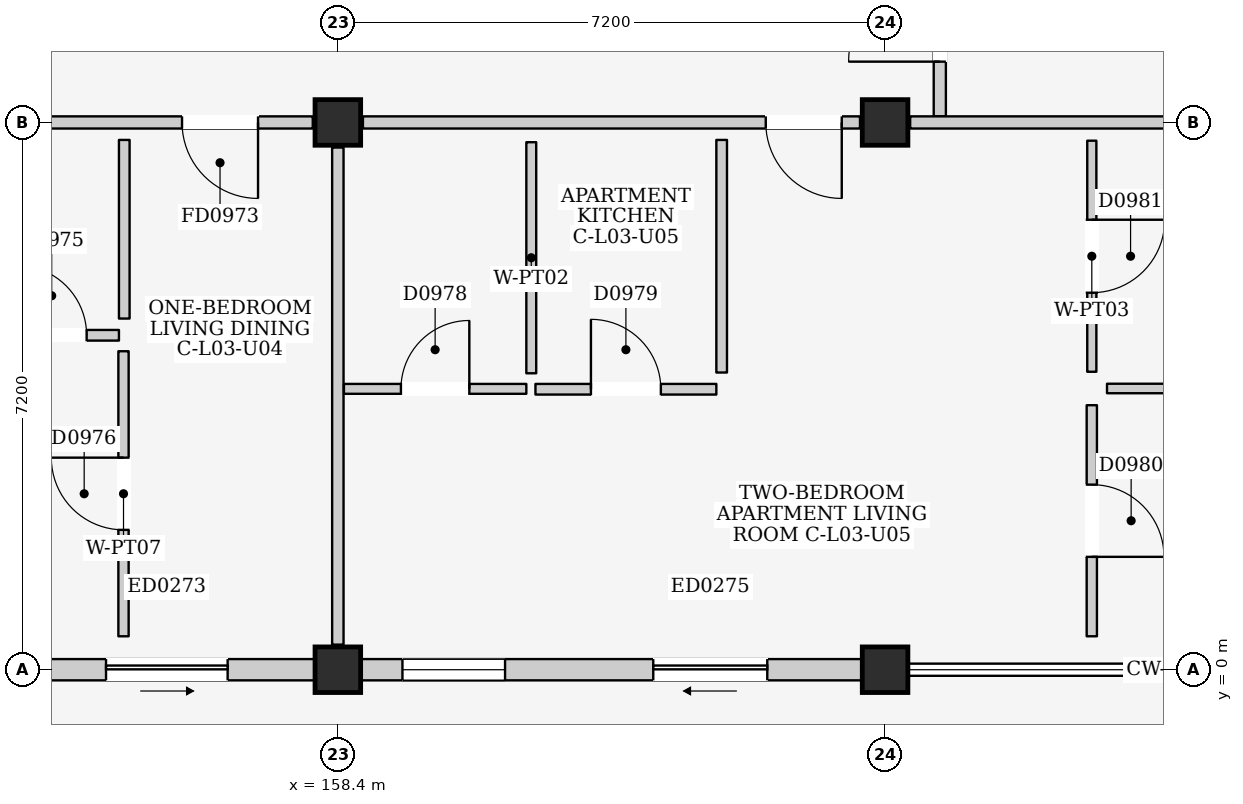
"""IFC4 building model, lengths in metres.
Left out: names, types, materials, properties, quantities, classifications, styles, units other than length and angle.
Written with IfcOpenShell. Run it as: python <this file> out.ifc"""

import sys

from ifc_helpers import new_model, si_unit, direction, frame, frame_2d, origin, origin_2d, place, context, subcontext, project, spatial, rectangle, extrude, element, fill, save


model = new_model("IFC4")
c1 = context("Model", 3, precision=1e-05, world=origin(), true_north=direction((0.0, 1.0)))
c2 = subcontext(c1, "Body", "Model", "MODEL_VIEW")
j1 = project(units=[si_unit("LENGTHUNIT", "METRE"), si_unit("PLANEANGLEUNIT", "RADIAN")], contexts=[c1])
p1 = place(None, origin())
s1 = spatial("IfcSite", under=j1, at=p1, CompositionType="ELEMENT")
p2 = place(p1, origin())
s2 = spatial("IfcBuilding", under=s1, at=p2, CompositionType="ELEMENT")
p3 = place(p2, frame((0.0, 0.0, 12.2)))
s3 = spatial("IfcBuildingStorey", under=s2, at=p3, CompositionType="ELEMENT", Elevation=12.2)
for number, where, z_axis, x_axis in (
    (1, (158.4, 0.0, 0.0), (0.0, 0.0, 1.0), (1.0, 0.0, 0.0)),
    (2, (158.4, 7.2, 0.0), (0.0, 0.0, 1.0), (1.0, 0.0, 0.0)),
    (3, (165.6, 0.0, 0.0), (0.0, 0.0, 1.0), (1.0, 0.0, 0.0)),
    (4, (165.6, 7.2, 0.0), (0.0, 0.0, 1.0), (1.0, 0.0, 0.0)),
):
    element("IfcColumn", number, at=place(p3, frame(where, z_axis=z_axis, x_axis=x_axis)), inside=s3, PredefinedType="COLUMN", context=c2, shape_type="SweptSolid", body=[
        extrude(rectangle(XDim=0.6, YDim=0.6, at=origin_2d()), origin(), (0.0, 0.0, 1.0), 3.2),
    ])
p4 = place(p3, frame((151.5, 0.0, 0.0), z_axis=(0.0, 0.0, 1.0), x_axis=(1.0, 0.0, 0.0)))
e5 = element("IfcWall", 5, at=p4, inside=s3, PredefinedType="ELEMENTEDWALL", context=c2, shape_type="SweptSolid", body=[
    extrude(rectangle(XDim=6.6, YDim=0.28, at=frame_2d((3.3, 0.0))), origin(), (0.0, 0.0, 1.0), 2.445),
])
p5 = place(p4, frame((3.85, 0.0, 0.0)))
e6 = element("IfcOpeningElement", 6, at=p5, cuts=e5, PredefinedType="OPENING", context=c2, shape_type="SweptSolid", body=[
    extrude(rectangle(XDim=1.6, YDim=2.12, at=frame_2d((0.8, 1.06))), frame((0.0, 0.155, 0.0), z_axis=(0.0, -1.0, 0.0), x_axis=(1.0, 0.0, 0.0)), (0.0, 0.0, 1.0), 0.31),
])
p6 = place(p4, frame((0.55, 0.0, 0.9)))
e7 = element("IfcOpeningElement", 7, at=p6, cuts=e5, PredefinedType="OPENING", context=c2, shape_type="SweptSolid", body=[
    extrude(rectangle(XDim=1.4, YDim=1.2, at=frame_2d((0.7, 0.6))), frame((0.0, 0.155, 0.0), z_axis=(0.0, -1.0, 0.0), x_axis=(1.0, 0.0, 0.0)), (0.0, 0.0, 1.0), 0.31),
])
p7 = place(p3, frame((158.7, 0.0, 0.0), z_axis=(0.0, 0.0, 1.0), x_axis=(1.0, 0.0, 0.0)))
e8 = element("IfcWall", 8, at=p7, inside=s3, PredefinedType="ELEMENTEDWALL", context=c2, shape_type="SweptSolid", body=[
    extrude(rectangle(XDim=6.6, YDim=0.28, at=frame_2d((3.3, 0.0))), origin(), (0.0, 0.0, 1.0), 2.445),
])
p8 = place(p7, frame((3.85, 0.0, 0.0)))
e9 = element("IfcOpeningElement", 9, at=p8, cuts=e8, PredefinedType="OPENING", context=c2, shape_type="SweptSolid", body=[
    extrude(rectangle(XDim=1.5, YDim=2.12, at=frame_2d((0.75, 1.06))), frame((0.0, 0.155, 0.0), z_axis=(0.0, -1.0, 0.0), x_axis=(1.0, 0.0, 0.0)), (0.0, 0.0, 1.0), 0.31),
])
p9 = place(p7, frame((0.55, 0.0, 0.835)))
e10 = element("IfcOpeningElement", 10, at=p9, cuts=e8, PredefinedType="OPENING", context=c2, shape_type="SweptSolid", body=[
    extrude(rectangle(XDim=1.35, YDim=1.5, at=frame_2d((0.675, 0.75))), frame((0.0, 0.155, 0.0), z_axis=(0.0, -1.0, 0.0), x_axis=(1.0, 0.0, 0.0)), (0.0, 0.0, 1.0), 0.31),
])
p10 = place(p3, frame((166.32, 7.28, 0.0), z_axis=(0.0, 0.0, 1.0), x_axis=(0.0, 1.0, 0.0)))
e11 = element("IfcWall", 11, at=p10, inside=s3, PredefinedType="PARTITIONING", context=c2, shape_type="SweptSolid", body=[
    extrude(rectangle(XDim=4.32, YDim=0.16, at=frame_2d((2.16, 0.0))), origin(), (0.0, 0.0, 1.0), 2.98),
])
p11 = place(p10, frame((0.72, 0.0, 0.0)))
e12 = element("IfcOpeningElement", 12, at=p11, cuts=e11, PredefinedType="OPENING", context=c2, shape_type="SweptSolid", body=[
    extrude(rectangle(XDim=1.2, YDim=2.2, at=frame_2d((0.6, 1.1))), frame((0.0, 0.095, 0.0), z_axis=(0.0, -1.0, 0.0), x_axis=(1.0, 0.0, 0.0)), (0.0, 0.0, 1.0), 0.19),
])
p12 = place(p3, frame((151.53, 7.2, 0.0), z_axis=(0.0, 0.0, 1.0), x_axis=(1.0, 0.0, 0.0)))
e13 = element("IfcWall", 13, at=p12, inside=s3, PredefinedType="PARTITIONING", context=c2, shape_type="SweptSolid", body=[
    extrude(rectangle(XDim=6.54, YDim=0.16, at=frame_2d((3.27, 0.0))), origin(), (0.0, 0.0, 1.0), 2.365),
])
p13 = place(p12, frame((4.82, 0.0, 0.0)))
e14 = element("IfcOpeningElement", 14, at=p13, cuts=e13, PredefinedType="OPENING", context=c2, shape_type="SweptSolid", body=[
    extrude(rectangle(XDim=1.0, YDim=2.15, at=frame_2d((0.5, 1.075))), frame((0.0, 0.095, 0.0), z_axis=(0.0, -1.0, 0.0), x_axis=(1.0, 0.0, 0.0)), (0.0, 0.0, 1.0), 0.19),
])
p14 = place(p3, frame((158.4, 0.33, 0.0), z_axis=(0.0, 0.0, 1.0), x_axis=(0.0, 1.0, 0.0)))
e15 = element("IfcWall", 15, at=p14, inside=s3, PredefinedType="PARTITIONING", context=c2, shape_type="SweptSolid", body=[
    extrude(rectangle(XDim=6.54, YDim=0.15, at=frame_2d((3.27, 0.0))), origin(), (0.0, 0.0, 1.0), 2.415),
])
p15 = place(p3, frame((153.75, 4.4, 0.0), z_axis=(0.0, 0.0, 1.0), x_axis=(1.0, 0.0, 0.0)))
e16 = element("IfcWall", 16, at=p15, inside=s3, PredefinedType="PARTITIONING", context=c2, shape_type="SweptSolid", body=[
    extrude(rectangle(XDim=1.77, YDim=0.14, at=frame_2d((0.885, 0.0))), origin(), (0.0, 0.0, 1.0), 2.98),
])
p16 = place(p15, frame((0.425, 0.0, 0.0)))
e17 = element("IfcOpeningElement", 17, at=p16, cuts=e16, PredefinedType="OPENING", context=c2, shape_type="SweptSolid", body=[
    extrude(rectangle(XDim=0.92, YDim=2.1, at=frame_2d((0.46, 1.05))), frame((0.0, 0.085, 0.0), z_axis=(0.0, -1.0, 0.0), x_axis=(1.0, 0.0, 0.0)), (0.0, 0.0, 1.0), 0.17),
])
p17 = place(p3, frame((155.59, 4.62, 0.0), z_axis=(0.0, 0.0, 1.0), x_axis=(0.0, 1.0, 0.0)))
e18 = element("IfcWall", 18, at=p17, inside=s3, PredefinedType="PARTITIONING", context=c2, shape_type="SweptSolid", body=[
    extrude(rectangle(XDim=2.35, YDim=0.14, at=frame_2d((1.175, 0.0))), origin(), (0.0, 0.0, 1.0), 2.98),
])
p18 = place(p3, frame((155.58, 0.44, 0.0), z_axis=(0.0, 0.0, 1.0), x_axis=(0.0, 1.0, 0.0)))
e19 = element("IfcWall", 19, at=p18, inside=s3, PredefinedType="PARTITIONING", context=c2, shape_type="SweptSolid", body=[
    extrude(rectangle(XDim=3.75, YDim=0.135, at=frame_2d((1.875, 0.0))), origin(), (0.0, 0.0, 1.0), 2.98),
])
p19 = place(p18, frame((1.4, 0.0, 0.0)))
e20 = element("IfcOpeningElement", 20, at=p19, cuts=e19, PredefinedType="OPENING", context=c2, shape_type="SweptSolid", body=[
    extrude(rectangle(XDim=0.95, YDim=2.15, at=frame_2d((0.475, 1.075))), frame((0.0, 0.083, 0.0), z_axis=(0.0, -1.0, 0.0), x_axis=(1.0, 0.0, 0.0)), (0.0, 0.0, 1.0), 0.165),
])
p20 = place(p3, frame((158.73, 7.2, 0.0), z_axis=(0.0, 0.0, 1.0), x_axis=(1.0, 0.0, 0.0)))
e21 = element("IfcWall", 21, at=p20, inside=s3, PredefinedType="PARTITIONING", context=c2, shape_type="SweptSolid", body=[
    extrude(rectangle(XDim=6.54, YDim=0.16, at=frame_2d((3.27, 0.0))), origin(), (0.0, 0.0, 1.0), 2.365),
])
p21 = place(p20, frame((5.3, 0.0, 0.0)))
e22 = element("IfcOpeningElement", 22, at=p21, cuts=e21, PredefinedType="OPENING", context=c2, shape_type="SweptSolid", body=[
    extrude(rectangle(XDim=1.0, YDim=2.15, at=frame_2d((0.5, 1.075))), frame((0.0, 0.095, 0.0), z_axis=(0.0, -1.0, 0.0), x_axis=(1.0, 0.0, 0.0)), (0.0, 0.0, 1.0), 0.19),
])
p22 = place(p3, frame((165.93, 7.2, 0.0), z_axis=(0.0, 0.0, 1.0), x_axis=(1.0, 0.0, 0.0)))
e23 = element("IfcWall", 23, at=p22, inside=s3, PredefinedType="PARTITIONING", context=c2, shape_type="SweptSolid", body=[
    extrude(rectangle(XDim=6.54, YDim=0.16, at=frame_2d((3.27, 0.0))), origin(), (0.0, 0.0, 1.0), 2.365),
])
p23 = place(p3, frame((158.48, 3.695, 0.0), z_axis=(0.0, 0.0, 1.0), x_axis=(1.0, 0.0, 0.0)))
e24 = element("IfcWall", 24, at=p23, inside=s3, PredefinedType="PARTITIONING", context=c2, shape_type="SweptSolid", body=[
    extrude(rectangle(XDim=2.4, YDim=0.13, at=frame_2d((1.2, 0.0))), origin(), (0.0, 0.0, 1.0), 2.98),
])
p24 = place(p23, frame((0.75, 0.0, 0.0)))
e25 = element("IfcOpeningElement", 25, at=p24, cuts=e24, PredefinedType="OPENING", context=c2, shape_type="SweptSolid", body=[
    extrude(rectangle(XDim=0.9, YDim=2.1, at=frame_2d((0.45, 1.05))), frame((0.0, 0.08, 0.0), z_axis=(0.0, -1.0, 0.0), x_axis=(1.0, 0.0, 0.0)), (0.0, 0.0, 1.0), 0.16),
])
p25 = place(p3, frame((160.945, 3.9, 0.0), z_axis=(0.0, 0.0, 1.0), x_axis=(0.0, 1.0, 0.0)))
e26 = element("IfcWall", 26, at=p25, inside=s3, PredefinedType="PARTITIONING", context=c2, shape_type="SweptSolid", body=[
    extrude(rectangle(XDim=3.04, YDim=0.13, at=frame_2d((1.52, 0.0))), origin(), (0.0, 0.0, 1.0), 2.98),
])
p26 = place(p3, frame((161.0, 3.69, 0.0), z_axis=(0.0, 0.0, 1.0), x_axis=(1.0, 0.0, 0.0)))
e27 = element("IfcWall", 27, at=p26, inside=s3, PredefinedType="PARTITIONING", context=c2, shape_type="SweptSolid", body=[
    extrude(rectangle(XDim=2.38, YDim=0.14, at=frame_2d((1.19, 0.0))), origin(), (0.0, 0.0, 1.0), 2.98),
])
p27 = place(p26, frame((0.73, 0.0, 0.0)))
e28 = element("IfcOpeningElement", 28, at=p27, cuts=e27, PredefinedType="OPENING", context=c2, shape_type="SweptSolid", body=[
    extrude(rectangle(XDim=0.92, YDim=2.1, at=frame_2d((0.46, 1.05))), frame((0.0, 0.085, 0.0), z_axis=(0.0, -1.0, 0.0), x_axis=(1.0, 0.0, 0.0)), (0.0, 0.0, 1.0), 0.17),
])
p28 = place(p3, frame((163.45, 3.91, 0.0), z_axis=(0.0, 0.0, 1.0), x_axis=(0.0, 1.0, 0.0)))
e29 = element("IfcWall", 29, at=p28, inside=s3, PredefinedType="PARTITIONING", context=c2, shape_type="SweptSolid", body=[
    extrude(rectangle(XDim=3.06, YDim=0.14, at=frame_2d((1.53, 0.0))), origin(), (0.0, 0.0, 1.0), 2.98),
])
p29 = place(p3, frame((168.32, 0.44, 0.0), z_axis=(0.0, 0.0, 1.0), x_axis=(0.0, 1.0, 0.0)))
e30 = element("IfcWall", 30, at=p29, inside=s3, PredefinedType="PARTITIONING", context=c2, shape_type="SweptSolid", body=[
    extrude(rectangle(XDim=3.04, YDim=0.135, at=frame_2d((1.52, 0.0))), origin(), (0.0, 0.0, 1.0), 2.98),
])
p30 = place(p29, frame((1.045, 0.0, 0.0)))
e31 = element("IfcOpeningElement", 31, at=p30, cuts=e30, PredefinedType="OPENING", context=c2, shape_type="SweptSolid", body=[
    extrude(rectangle(XDim=0.95, YDim=2.15, at=frame_2d((0.475, 1.075))), frame((0.0, 0.083, 0.0), z_axis=(0.0, -1.0, 0.0), x_axis=(1.0, 0.0, 0.0)), (0.0, 0.0, 1.0), 0.165),
])
p31 = place(p3, frame((168.52, 3.7, 0.0), z_axis=(0.0, 0.0, 1.0), x_axis=(1.0, 0.0, 0.0)))
e32 = element("IfcWall", 32, at=p31, inside=s3, PredefinedType="PARTITIONING", context=c2, shape_type="SweptSolid", body=[
    extrude(rectangle(XDim=4.06, YDim=0.125, at=frame_2d((2.03, 0.0))), origin(), (0.0, 0.0, 1.0), 2.98),
])
p32 = place(p3, frame((168.32, 3.92, 0.0), z_axis=(0.0, 0.0, 1.0), x_axis=(0.0, 1.0, 0.0)))
e33 = element("IfcWall", 33, at=p32, inside=s3, PredefinedType="PARTITIONING", context=c2, shape_type="SweptSolid", body=[
    extrude(rectangle(XDim=3.04, YDim=0.12, at=frame_2d((1.52, 0.0))), origin(), (0.0, 0.0, 1.0), 2.98),
])
p33 = place(p32, frame((1.04, 0.0, 0.0)))
e34 = element("IfcOpeningElement", 34, at=p33, cuts=e33, PredefinedType="OPENING", context=c2, shape_type="SweptSolid", body=[
    extrude(rectangle(XDim=0.96, YDim=2.15, at=frame_2d((0.48, 1.075))), frame((0.0, 0.075, 0.0), z_axis=(0.0, -1.0, 0.0), x_axis=(1.0, 0.0, 0.0)), (0.0, 0.0, 1.0), 0.15),
])
p34 = place(p5, frame((1.6, 0.0, 0.0), z_axis=(0.0, 0.0, 1.0), x_axis=(-1.0, 0.0, 0.0)))
e35 = element("IfcDoor", 35, at=p34, inside=s3, OperationType="SLIDING_TO_RIGHT", PredefinedType="DOOR", context=c2, shape_type="SweptSolid", body=[
    extrude(rectangle(XDim=1.6, YDim=2.12, at=frame_2d((0.8, 1.06))), frame((0.0, 0.025, 0.0), z_axis=(0.0, -1.0, 0.0), x_axis=(1.0, 0.0, 0.0)), (0.0, 0.0, 1.0), 0.05),
])
fill(e6, e35)
p35 = place(p8, frame((1.5, 0.0, 0.0), z_axis=(0.0, 0.0, 1.0), x_axis=(-1.0, 0.0, 0.0)))
e36 = element("IfcDoor", 36, at=p35, inside=s3, OperationType="SLIDING_TO_LEFT", PredefinedType="DOOR", context=c2, shape_type="SweptSolid", body=[
    extrude(rectangle(XDim=1.5, YDim=2.12, at=frame_2d((0.75, 1.06))), frame((0.0, 0.025, 0.0), z_axis=(0.0, -1.0, 0.0), x_axis=(1.0, 0.0, 0.0)), (0.0, 0.0, 1.0), 0.05),
])
fill(e9, e36)
p36 = place(p9, origin())
e37 = element("IfcWindow", 37, at=p36, inside=s3, PartitioningType="SINGLE_PANEL", PredefinedType="WINDOW", context=c2, shape_type="SweptSolid", body=[
    extrude(rectangle(XDim=1.35, YDim=1.5, at=frame_2d((0.675, 0.75))), frame((0.0, 0.03, 0.0), z_axis=(0.0, -1.0, 0.0), x_axis=(1.0, 0.0, 0.0)), (0.0, 0.0, 1.0), 0.06),
])
fill(e10, e37)
p37 = place(p11, origin())
e38 = element("IfcDoor", 38, at=p37, inside=s3, OperationType="SINGLE_SWING_LEFT", PredefinedType="DOOR", context=c2, shape_type="SweptSolid", body=[
    extrude(rectangle(XDim=1.2, YDim=2.2, at=frame_2d((0.6, 1.1))), frame((0.0, 0.025, 0.0), z_axis=(0.0, -1.0, 0.0), x_axis=(1.0, 0.0, 0.0)), (0.0, 0.0, 1.0), 0.05),
])
fill(e12, e38)
p38 = place(p13, frame((1.0, 0.0, 0.0), z_axis=(0.0, 0.0, 1.0), x_axis=(-1.0, 0.0, 0.0)))
e39 = element("IfcDoor", 39, at=p38, inside=s3, OperationType="SINGLE_SWING_LEFT", PredefinedType="DOOR", context=c2, shape_type="SweptSolid", body=[
    extrude(rectangle(XDim=1.0, YDim=2.15, at=frame_2d((0.5, 1.075))), frame((0.0, 0.025, 0.0), z_axis=(0.0, -1.0, 0.0), x_axis=(1.0, 0.0, 0.0)), (0.0, 0.0, 1.0), 0.05),
])
fill(e14, e39)
p39 = place(p16, origin())
e40 = element("IfcDoor", 40, at=p39, inside=s3, OperationType="SINGLE_SWING_LEFT", PredefinedType="DOOR", context=c2, shape_type="SweptSolid", body=[
    extrude(rectangle(XDim=0.92, YDim=2.1, at=frame_2d((0.46, 1.05))), frame((0.0, 0.025, 0.0), z_axis=(0.0, -1.0, 0.0), x_axis=(1.0, 0.0, 0.0)), (0.0, 0.0, 1.0), 0.05),
])
fill(e17, e40)
p40 = place(p19, origin())
e41 = element("IfcDoor", 41, at=p40, inside=s3, OperationType="SINGLE_SWING_RIGHT", PredefinedType="DOOR", context=c2, shape_type="SweptSolid", body=[
    extrude(rectangle(XDim=0.95, YDim=2.15, at=frame_2d((0.475, 1.075))), frame((0.0, 0.025, 0.0), z_axis=(0.0, -1.0, 0.0), x_axis=(1.0, 0.0, 0.0)), (0.0, 0.0, 1.0), 0.05),
])
fill(e20, e41)
p41 = place(p21, frame((1.0, 0.0, 0.0), z_axis=(0.0, 0.0, 1.0), x_axis=(-1.0, 0.0, 0.0)))
e42 = element("IfcDoor", 42, at=p41, inside=s3, OperationType="SINGLE_SWING_LEFT", PredefinedType="DOOR", context=c2, shape_type="SweptSolid", body=[
    extrude(rectangle(XDim=1.0, YDim=2.15, at=frame_2d((0.5, 1.075))), frame((0.0, 0.025, 0.0), z_axis=(0.0, -1.0, 0.0), x_axis=(1.0, 0.0, 0.0)), (0.0, 0.0, 1.0), 0.05),
])
fill(e22, e42)
p42 = place(p24, origin())
e43 = element("IfcDoor", 43, at=p42, inside=s3, OperationType="SINGLE_SWING_RIGHT", PredefinedType="DOOR", context=c2, shape_type="SweptSolid", body=[
    extrude(rectangle(XDim=0.9, YDim=2.1, at=frame_2d((0.45, 1.05))), frame((0.0, 0.025, 0.0), z_axis=(0.0, -1.0, 0.0), x_axis=(1.0, 0.0, 0.0)), (0.0, 0.0, 1.0), 0.05),
])
fill(e25, e43)
p43 = place(p27, origin())
e44 = element("IfcDoor", 44, at=p43, inside=s3, OperationType="SINGLE_SWING_LEFT", PredefinedType="DOOR", context=c2, shape_type="SweptSolid", body=[
    extrude(rectangle(XDim=0.92, YDim=2.1, at=frame_2d((0.46, 1.05))), frame((0.0, 0.025, 0.0), z_axis=(0.0, -1.0, 0.0), x_axis=(1.0, 0.0, 0.0)), (0.0, 0.0, 1.0), 0.05),
])
fill(e28, e44)
p44 = place(p30, frame((0.95, 0.0, 0.0), z_axis=(0.0, 0.0, 1.0), x_axis=(-1.0, 0.0, 0.0)))
e45 = element("IfcDoor", 45, at=p44, inside=s3, OperationType="SINGLE_SWING_RIGHT", PredefinedType="DOOR", context=c2, shape_type="SweptSolid", body=[
    extrude(rectangle(XDim=0.95, YDim=2.15, at=frame_2d((0.475, 1.075))), frame((0.0, 0.025, 0.0), z_axis=(0.0, -1.0, 0.0), x_axis=(1.0, 0.0, 0.0)), (0.0, 0.0, 1.0), 0.05),
])
fill(e31, e45)
p45 = place(p33, frame((0.96, 0.0, 0.0), z_axis=(0.0, 0.0, 1.0), x_axis=(-1.0, 0.0, 0.0)))
e46 = element("IfcDoor", 46, at=p45, inside=s3, OperationType="SINGLE_SWING_LEFT", PredefinedType="DOOR", context=c2, shape_type="SweptSolid", body=[
    extrude(rectangle(XDim=0.96, YDim=2.15, at=frame_2d((0.48, 1.075))), frame((0.0, 0.025, 0.0), z_axis=(0.0, -1.0, 0.0), x_axis=(1.0, 0.0, 0.0)), (0.0, 0.0, 1.0), 0.05),
])
fill(e34, e46)
save(model, sys.argv[1])
